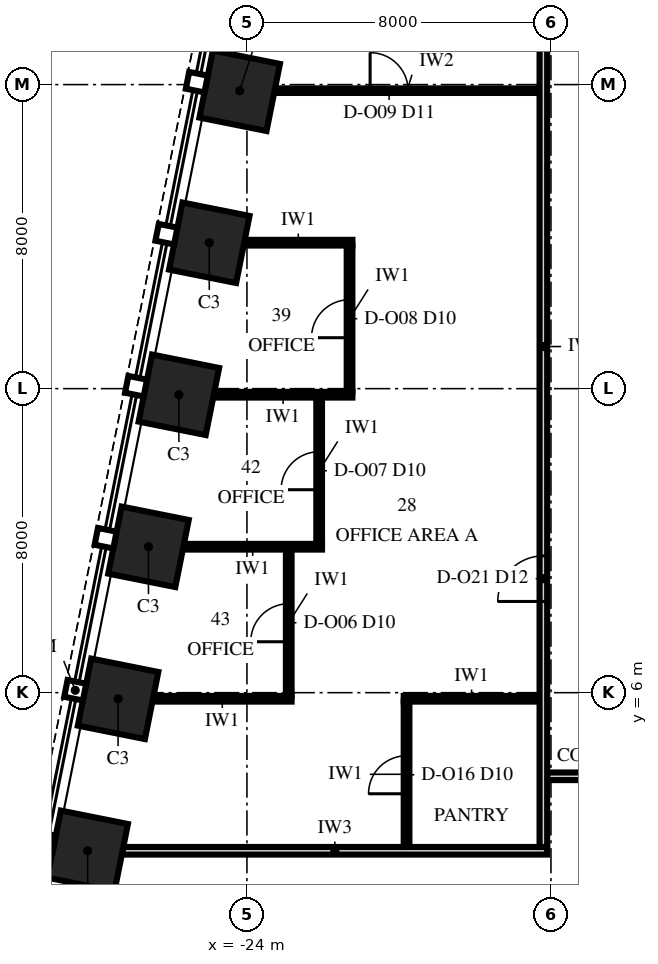
"""IFC4 building model, lengths in metres.
Left out: names, types, materials, properties, quantities, classifications, styles, units other than length and angle.
Written with IfcOpenShell. Run it as: python <this file> out.ifc"""

import sys

from ifc_helpers import new_model, si_unit, direction, frame, frame_2d, origin, origin_2d, place, context, subcontext, project, spatial, rectangle, extrude, element, fill, save


model = new_model("IFC4")
c1 = context("Model", 3, precision=1e-05, world=origin(), true_north=direction((0.0, 1.0)))
c2 = subcontext(c1, "Body", "Model", "MODEL_VIEW")
j1 = project(units=[si_unit("LENGTHUNIT", "METRE"), si_unit("PLANEANGLEUNIT", "RADIAN")], contexts=[c1])
p1 = place(None, origin())
s1 = spatial("IfcSite", under=j1, at=p1, CompositionType="ELEMENT")
p2 = place(p1, origin())
s2 = spatial("IfcBuilding", under=s1, at=p2, CompositionType="ELEMENT")
p3 = place(p2, frame((0.0, 0.0, 115.0)))
s3 = spatial("IfcBuildingStorey", under=s2, at=p3, CompositionType="ELEMENT", Elevation=115.0)
for number, where, z_axis, x_axis in (
    (1, (-24.191, 21.838, 0.0), (0.0, 0.0, 1.0), (-0.196, -0.981, 0.0)),
    (2, (-24.991, 17.838, 0.0), (0.0, 0.0, 1.0), (-0.196, -0.981, 0.0)),
    (3, (-25.791, 13.838, 0.0), (0.0, 0.0, 1.0), (-0.196, -0.981, 0.0)),
    (4, (-26.591, 9.838, 0.0), (0.0, 0.0, 1.0), (-0.196, -0.981, 0.0)),
    (5, (-27.391, 5.838, 0.0), (0.0, 0.0, 1.0), (-0.196, -0.981, 0.0)),
    (6, (-28.191, 1.838, 0.0), (0.0, 0.0, 1.0), (-0.196, -0.981, 0.0)),
):
    element("IfcColumn", number, at=place(p3, frame(where, z_axis=z_axis, x_axis=x_axis)), inside=s3, PredefinedType="COLUMN", context=c2, shape_type="SweptSolid", body=[
        extrude(rectangle(XDim=1.8, YDim=1.8, at=origin_2d()), origin(), (0.0, 0.0, 1.0), 4.0),
    ])
p4 = place(p3, frame((-27.273, 1.84, 0.0), z_axis=(0.0, 0.0, 1.0), x_axis=(1.0, 0.0, 0.0)))
e7 = element("IfcWall", 7, at=p4, inside=s3, PredefinedType="PARTITIONING", context=c2, shape_type="SweptSolid", body=[
    extrude(rectangle(XDim=11.173, YDim=0.2, at=frame_2d((5.586, 0.0))), origin(), (0.0, 0.0, 1.0), 3.25),
])
p5 = place(p3, frame((-16.1, 3.8, 0.0), z_axis=(0.0, 0.0, 1.0), x_axis=(1.0, 0.0, 0.0)))
e8 = element("IfcWall", 8, at=p5, inside=s3, PredefinedType="PARTITIONING", context=c2, shape_type="SweptSolid", body=[
    extrude(rectangle(XDim=32.2, YDim=0.2, at=frame_2d((16.1, 0.0))), origin(), (0.0, 0.0, 1.0), 3.25),
])
p6 = place(p5, frame((15.5, 0.0, 0.0)))
e9 = element("IfcOpeningElement", 9, at=p6, cuts=e8, PredefinedType="OPENING", context=c2, shape_type="SweptSolid", body=[
    extrude(rectangle(XDim=1.2, YDim=2.4, at=frame_2d((0.6, 1.2))), frame((0.0, 0.115, 0.0), z_axis=(0.0, -1.0, 0.0), x_axis=(1.0, 0.0, 0.0)), (0.0, 0.0, 1.0), 0.23),
])
p7 = place(p3, frame((-26.473, 5.84, 0.0), z_axis=(0.0, 0.0, 1.0), x_axis=(1.0, 0.0, 0.0)))
e10 = element("IfcWall", 10, at=p7, inside=s3, PredefinedType="PARTITIONING", context=c2, shape_type="SweptSolid", body=[
    extrude(rectangle(XDim=3.648, YDim=0.15, at=frame_2d((1.824, 0.0))), origin(), (0.0, 0.0, 1.0), 2.842),
])
p8 = place(p3, frame((-19.875, 5.84, 0.0), z_axis=(0.0, 0.0, 1.0), x_axis=(1.0, 0.0, 0.0)))
e11 = element("IfcWall", 11, at=p8, inside=s3, PredefinedType="PARTITIONING", context=c2, shape_type="SweptSolid", body=[
    extrude(rectangle(XDim=3.575, YDim=0.15, at=frame_2d((1.788, 0.0))), origin(), (0.0, 0.0, 1.0), 3.25),
])
p9 = place(p3, frame((-25.673, 9.84, 0.0), z_axis=(0.0, 0.0, 1.0), x_axis=(1.0, 0.0, 0.0)))
e12 = element("IfcWall", 12, at=p9, inside=s3, PredefinedType="PARTITIONING", context=c2, shape_type="SweptSolid", body=[
    extrude(rectangle(XDim=3.648, YDim=0.15, at=frame_2d((1.824, 0.0))), origin(), (0.0, 0.0, 1.0), 3.25),
])
p10 = place(p3, frame((-24.873, 13.84, 0.0), z_axis=(0.0, 0.0, 1.0), x_axis=(1.0, 0.0, 0.0)))
e13 = element("IfcWall", 13, at=p10, inside=s3, PredefinedType="PARTITIONING", context=c2, shape_type="SweptSolid", body=[
    extrude(rectangle(XDim=3.648, YDim=0.15, at=frame_2d((1.824, 0.0))), origin(), (0.0, 0.0, 1.0), 3.25),
])
p11 = place(p3, frame((-24.073, 17.84, 0.0), z_axis=(0.0, 0.0, 1.0), x_axis=(1.0, 0.0, 0.0)))
e14 = element("IfcWall", 14, at=p11, inside=s3, PredefinedType="PARTITIONING", context=c2, shape_type="SweptSolid", body=[
    extrude(rectangle(XDim=2.848, YDim=0.15, at=frame_2d((1.424, 0.0))), origin(), (0.0, 0.0, 1.0), 3.25),
])
p12 = place(p3, frame((-23.273, 21.84, 0.0), z_axis=(0.0, 0.0, 1.0), x_axis=(1.0, 0.0, 0.0)))
e15 = element("IfcWall", 15, at=p12, inside=s3, PredefinedType="PARTITIONING", context=c2, shape_type="SweptSolid", body=[
    extrude(rectangle(XDim=6.973, YDim=0.12, at=frame_2d((3.486, 0.0))), origin(), (0.0, 0.0, 1.0), 3.25),
])
p13 = place(p12, frame((2.514, 0.0, 0.0)))
e16 = element("IfcOpeningElement", 16, at=p13, cuts=e15, PredefinedType="OPENING", context=c2, shape_type="SweptSolid", body=[
    extrude(rectangle(XDim=1.0, YDim=2.4, at=frame_2d((0.5, 1.2))), frame((0.0, 0.075, 0.0), z_axis=(0.0, -1.0, 0.0), x_axis=(1.0, 0.0, 0.0)), (0.0, 0.0, 1.0), 0.15),
])
p14 = place(p3, frame((-22.9, 5.915, 0.0), z_axis=(0.0, 0.0, 1.0), x_axis=(0.0, 1.0, 0.0)))
e17 = element("IfcWall", 17, at=p14, inside=s3, PredefinedType="PARTITIONING", context=c2, shape_type="SweptSolid", body=[
    extrude(rectangle(XDim=3.85, YDim=0.15, at=frame_2d((1.925, 0.0))), origin(), (0.0, 0.0, 1.0), 2.842),
])
p15 = place(p14, frame((1.425, 0.0, 0.0)))
e18 = element("IfcOpeningElement", 18, at=p15, cuts=e17, PredefinedType="OPENING", context=c2, shape_type="SweptSolid", body=[
    extrude(rectangle(XDim=1.0, YDim=2.3, at=frame_2d((0.5, 1.15))), frame((0.0, 0.09, 0.0), z_axis=(0.0, -1.0, 0.0), x_axis=(1.0, 0.0, 0.0)), (0.0, 0.0, 1.0), 0.18),
])
p16 = place(p3, frame((-22.1, 9.915, 0.0), z_axis=(0.0, 0.0, 1.0), x_axis=(0.0, 1.0, 0.0)))
e19 = element("IfcWall", 19, at=p16, inside=s3, PredefinedType="PARTITIONING", context=c2, shape_type="SweptSolid", body=[
    extrude(rectangle(XDim=3.85, YDim=0.15, at=frame_2d((1.925, 0.0))), origin(), (0.0, 0.0, 1.0), 3.85),
])
p17 = place(p16, frame((1.425, 0.0, 0.0)))
e20 = element("IfcOpeningElement", 20, at=p17, cuts=e19, PredefinedType="OPENING", context=c2, shape_type="SweptSolid", body=[
    extrude(rectangle(XDim=1.0, YDim=2.3, at=frame_2d((0.5, 1.15))), frame((0.0, 0.09, 0.0), z_axis=(0.0, -1.0, 0.0), x_axis=(1.0, 0.0, 0.0)), (0.0, 0.0, 1.0), 0.18),
])
p18 = place(p3, frame((-21.3, 13.915, 0.0), z_axis=(0.0, 0.0, 1.0), x_axis=(0.0, 1.0, 0.0)))
e21 = element("IfcWall", 21, at=p18, inside=s3, PredefinedType="PARTITIONING", context=c2, shape_type="SweptSolid", body=[
    extrude(rectangle(XDim=3.85, YDim=0.15, at=frame_2d((1.925, 0.0))), origin(), (0.0, 0.0, 1.0), 3.25),
])
p19 = place(p18, frame((1.425, 0.0, 0.0)))
e22 = element("IfcOpeningElement", 22, at=p19, cuts=e21, PredefinedType="OPENING", context=c2, shape_type="SweptSolid", body=[
    extrude(rectangle(XDim=1.0, YDim=2.3, at=frame_2d((0.5, 1.15))), frame((0.0, 0.09, 0.0), z_axis=(0.0, -1.0, 0.0), x_axis=(1.0, 0.0, 0.0)), (0.0, 0.0, 1.0), 0.18),
])
p20 = place(p3, frame((-19.8, 1.94, 0.0), z_axis=(0.0, 0.0, 1.0), x_axis=(0.0, 1.0, 0.0)))
e23 = element("IfcWall", 23, at=p20, inside=s3, PredefinedType="PARTITIONING", context=c2, shape_type="SweptSolid", body=[
    extrude(rectangle(XDim=3.825, YDim=0.15, at=frame_2d((1.913, 0.0))), origin(), (0.0, 0.0, 1.0), 3.85),
])
p21 = place(p20, frame((1.4, 0.0, 0.0)))
e24 = element("IfcOpeningElement", 24, at=p21, cuts=e23, PredefinedType="OPENING", context=c2, shape_type="SweptSolid", body=[
    extrude(rectangle(XDim=1.0, YDim=2.3, at=frame_2d((0.5, 1.15))), frame((0.0, 0.09, 0.0), z_axis=(0.0, -1.0, 0.0), x_axis=(1.0, 0.0, 0.0)), (0.0, 0.0, 1.0), 0.18),
])
p22 = place(p3, frame((-16.2, 1.94, 0.0), z_axis=(0.0, 0.0, 1.0), x_axis=(0.0, 1.0, 0.0)))
e25 = element("IfcWall", 25, at=p22, inside=s3, PredefinedType="PARTITIONING", context=c2, shape_type="SweptSolid", body=[
    extrude(rectangle(XDim=26.335, YDim=0.2, at=frame_2d((13.167, 0.0))), origin(), (0.0, 0.0, 1.0), 2.842),
])
p23 = place(p22, frame((6.46, 0.0, 0.0)))
e26 = element("IfcOpeningElement", 26, at=p23, cuts=e25, PredefinedType="OPENING", context=c2, shape_type="SweptSolid", body=[
    extrude(rectangle(XDim=1.2, YDim=2.4, at=frame_2d((0.6, 1.2))), frame((0.0, 0.115, 0.0), z_axis=(0.0, -1.0, 0.0), x_axis=(1.0, 0.0, 0.0)), (0.0, 0.0, 1.0), 0.23),
])
p24 = place(p15, origin())
e27 = element("IfcDoor", 27, at=p24, inside=s3, OperationType="SINGLE_SWING_LEFT", PredefinedType="DOOR", context=c2, shape_type="SweptSolid", body=[
    extrude(rectangle(XDim=1.0, YDim=2.3, at=frame_2d((0.5, 1.15))), frame((0.0, 0.075, 0.0), z_axis=(0.0, -1.0, 0.0), x_axis=(1.0, 0.0, 0.0)), (0.0, 0.0, 1.0), 0.149),
])
fill(e18, e27)
p25 = place(p17, origin())
e28 = element("IfcDoor", 28, at=p25, inside=s3, OperationType="SINGLE_SWING_LEFT", PredefinedType="DOOR", context=c2, shape_type="SweptSolid", body=[
    extrude(rectangle(XDim=1.0, YDim=2.3, at=frame_2d((0.5, 1.15))), frame((0.0, 0.075, 0.0), z_axis=(0.0, -1.0, 0.0), x_axis=(1.0, 0.0, 0.0)), (0.0, 0.0, 1.0), 0.149),
])
fill(e20, e28)
p26 = place(p19, origin())
e29 = element("IfcDoor", 29, at=p26, inside=s3, OperationType="SINGLE_SWING_LEFT", PredefinedType="DOOR", context=c2, shape_type="SweptSolid", body=[
    extrude(rectangle(XDim=1.0, YDim=2.3, at=frame_2d((0.5, 1.15))), frame((0.0, 0.075, 0.0), z_axis=(0.0, -1.0, 0.0), x_axis=(1.0, 0.0, 0.0)), (0.0, 0.0, 1.0), 0.149),
])
fill(e22, e29)
p27 = place(p13, origin())
e30 = element("IfcDoor", 30, at=p27, inside=s3, OperationType="SINGLE_SWING_RIGHT", PredefinedType="DOOR", context=c2, shape_type="SweptSolid", body=[
    extrude(rectangle(XDim=1.0, YDim=2.4, at=frame_2d((0.5, 1.2))), frame((0.0, 0.06, 0.0), z_axis=(0.0, -1.0, 0.0), x_axis=(1.0, 0.0, 0.0)), (0.0, 0.0, 1.0), 0.12),
])
fill(e16, e30)
p28 = place(p21, origin())
e31 = element("IfcDoor", 31, at=p28, inside=s3, OperationType="SINGLE_SWING_LEFT", PredefinedType="DOOR", context=c2, shape_type="SweptSolid", body=[
    extrude(rectangle(XDim=1.0, YDim=2.3, at=frame_2d((0.5, 1.15))), frame((0.0, 0.075, 0.0), z_axis=(0.0, -1.0, 0.0), x_axis=(1.0, 0.0, 0.0)), (0.0, 0.0, 1.0), 0.149),
])
fill(e24, e31)
p29 = place(p23, origin())
e32 = element("IfcDoor", 32, at=p29, inside=s3, OperationType="SINGLE_SWING_LEFT", PredefinedType="DOOR", context=c2, shape_type="SweptSolid", body=[
    extrude(rectangle(XDim=1.2, YDim=2.4, at=frame_2d((0.6, 1.2))), frame((0.0, 0.1, 0.0), z_axis=(0.0, -1.0, 0.0), x_axis=(1.0, 0.0, 0.0)), (0.0, 0.0, 1.0), 0.199),
])
fill(e26, e32)
save(model, sys.argv[1])
